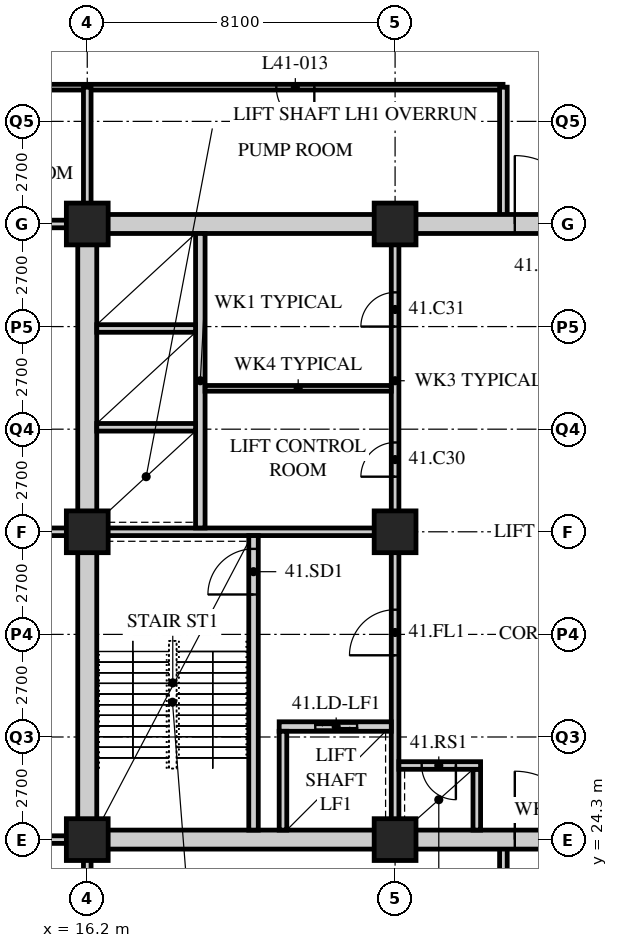
"""IFC4 building model, lengths in metres.
Left out: names, types, materials, properties, quantities, classifications, styles, units other than length and angle.
Written with IfcOpenShell. Run it as: python <this file> out.ifc"""

import sys

from ifc_helpers import new_model, si_unit, direction, frame, frame_2d, origin, origin_2d, place, context, subcontext, project, spatial, rectangle, hollow_rectangle, extrude, element, fill, save


model = new_model("IFC4")
c1 = context("Model", 3, precision=1e-05, world=origin(), true_north=direction((0.0, 1.0)))
c2 = subcontext(c1, "Body", "Model", "MODEL_VIEW")
j1 = project(units=[si_unit("LENGTHUNIT", "METRE"), si_unit("PLANEANGLEUNIT", "RADIAN")], contexts=[c1])
p1 = place(None, origin())
s1 = spatial("IfcSite", under=j1, at=p1, CompositionType="ELEMENT")
p2 = place(p1, origin())
s2 = spatial("IfcBuilding", under=s1, at=p2, CompositionType="ELEMENT")
p3 = place(p2, frame((0.0, 0.0, 157.8)))
s3 = spatial("IfcBuildingStorey", under=s2, at=p3, CompositionType="ELEMENT", Elevation=157.8)
for number, where, z_axis, x_axis in (
    (1, (16.2, 24.3, 0.0), (0.0, 0.0, 1.0), (1.0, 0.0, 0.0)),
    (2, (16.2, 32.4, 0.0), (0.0, 0.0, 1.0), (1.0, 0.0, 0.0)),
    (3, (16.2, 40.5, 0.0), (0.0, 0.0, 1.0), (1.0, 0.0, 0.0)),
    (4, (24.3, 24.3, 0.0), (0.0, 0.0, 1.0), (1.0, 0.0, 0.0)),
    (5, (24.3, 32.4, 0.0), (0.0, 0.0, 1.0), (1.0, 0.0, 0.0)),
    (6, (24.3, 40.5, 0.0), (0.0, 0.0, 1.0), (1.0, 0.0, 0.0)),
):
    element("IfcColumn", number, at=place(p3, frame(where, z_axis=z_axis, x_axis=x_axis)), inside=s3, PredefinedType="COLUMN", context=c2, shape_type="SweptSolid", body=[
        extrude(hollow_rectangle(XDim=1.1, YDim=1.1, WallThickness=0.1, at=origin_2d()), origin(), (0.0, 0.0, 1.0), 7.2),
    ])
p4 = place(p3, frame((27.14, 44.1, 0.0), z_axis=(0.0, 0.0, 1.0), x_axis=(-1.0, 0.0, 0.0)))
e7 = element("IfcWall", 7, at=p4, inside=s3, PredefinedType="PARTITIONING", context=c2, shape_type="SweptSolid", body=[
    extrude(rectangle(XDim=17.24, YDim=0.15, at=frame_2d((8.62, 0.0))), origin(), (0.0, 0.0, 1.0), 6.95),
])
p5 = place(p4, frame((13.59, 0.0, 0.0)))
e8 = element("IfcOpeningElement", 8, at=p5, cuts=e7, PredefinedType="OPENING", context=c2, shape_type="SweptSolid", body=[
    extrude(rectangle(XDim=1.0, YDim=2.1, at=frame_2d((0.5, 1.05))), frame((0.0, 0.085, 0.0), z_axis=(0.0, -1.0, 0.0), x_axis=(1.0, 0.0, 0.0)), (0.0, 0.0, 1.0), 0.17),
])
p6 = place(p4, frame((4.965, 0.0, 0.0)))
e9 = element("IfcOpeningElement", 9, at=p6, cuts=e7, PredefinedType="OPENING", context=c2, shape_type="SweptSolid", body=[
    extrude(rectangle(XDim=1.0, YDim=2.1, at=frame_2d((0.5, 1.05))), frame((0.0, 0.085, 0.0), z_axis=(0.0, -1.0, 0.0), x_axis=(1.0, 0.0, 0.0)), (0.0, 0.0, 1.0), 0.17),
])
p7 = place(p3, frame((9.9, 32.4, 0.0), z_axis=(0.0, 0.0, 1.0), x_axis=(1.0, 0.0, 0.0)))
e10 = element("IfcWall", 10, at=p7, inside=s3, PredefinedType="SOLIDWALL", context=c2, shape_type="SweptSolid", body=[
    extrude(rectangle(XDim=6.3, YDim=0.2, at=frame_2d((3.15, 0.0))), origin(), (0.0, 0.0, 1.0), 6.95),
])
p8 = place(p3, frame((16.2, 15.3, 0.0), z_axis=(0.0, 0.0, 1.0), x_axis=(0.0, 1.0, 0.0)))
e11 = element("IfcWall", 11, at=p8, inside=s3, PredefinedType="SOLIDWALL", context=c2, shape_type="SweptSolid", body=[
    extrude(rectangle(XDim=9.0, YDim=0.2, at=frame_2d((4.5, 0.0))), origin(), (0.0, 0.0, 1.0), 5.95),
])
p9 = place(p3, frame((27.15, 15.3, 0.0), z_axis=(0.0, 0.0, 1.0), x_axis=(0.0, 1.0, 0.0)))
e12 = element("IfcWall", 12, at=p9, inside=s3, PredefinedType="SOLIDWALL", context=c2, shape_type="SweptSolid", body=[
    extrude(rectangle(XDim=9.0, YDim=0.2, at=frame_2d((4.5, 0.0))), origin(), (0.0, 0.0, 1.0), 6.95),
])
p10 = place(p3, frame((16.2, 40.5, 0.0), z_axis=(0.0, 0.0, 1.0), x_axis=(0.0, 1.0, 0.0)))
e13 = element("IfcWall", 13, at=p10, inside=s3, PredefinedType="SOLIDWALL", context=c2, shape_type="SweptSolid", body=[
    extrude(rectangle(XDim=3.6, YDim=0.2, at=frame_2d((1.8, 0.0))), origin(), (0.0, 0.0, 1.0), 5.95),
])
p11 = place(p3, frame((27.15, 40.5, 0.0), z_axis=(0.0, 0.0, 1.0), x_axis=(0.0, 1.0, 0.0)))
e14 = element("IfcWall", 14, at=p11, inside=s3, PredefinedType="SOLIDWALL", context=c2, shape_type="SweptSolid", body=[
    extrude(rectangle(XDim=3.6, YDim=0.2, at=frame_2d((1.8, 0.0))), origin(), (0.0, 0.0, 1.0), 6.95),
])
for number, where, z_axis, x_axis in (
    (15, (9.9, 24.3, 0.0), (0.0, 0.0, 1.0), (1.0, 0.0, 0.0)),
    (16, (9.9, 40.5, 0.0), (0.0, 0.0, 1.0), (1.0, 0.0, 0.0)),
):
    element("IfcWall", number, at=place(p3, frame(where, z_axis=z_axis, x_axis=x_axis)), inside=s3, PredefinedType="SOLIDWALL", context=c2, shape_type="SweptSolid", body=[
        extrude(rectangle(XDim=6.3, YDim=0.2, at=frame_2d((3.15, 0.0))), origin(), (0.0, 0.0, 1.0), 6.95),
    ])
p12 = place(p3, frame((15.95, 24.3, 0.0), z_axis=(0.0, 0.0, 1.0), x_axis=(1.0, 0.0, 0.0)))
e17 = element("IfcWall", 17, at=p12, inside=s3, PredefinedType="SOLIDWALL", context=c2, shape_type="SweptSolid", body=[
    extrude(rectangle(XDim=24.8, YDim=0.5, at=frame_2d((12.4, 0.0))), origin(), (0.0, 0.0, 1.0), 6.18),
])
p13 = place(p12, frame((11.5, 0.0, 0.0)))
e18 = element("IfcOpeningElement", 18, at=p13, cuts=e17, PredefinedType="OPENING", context=c2, shape_type="SweptSolid", body=[
    extrude(rectangle(XDim=1.8, YDim=2.4, at=frame_2d((0.9, 1.2))), frame((0.0, 0.26, 0.0), z_axis=(0.0, -1.0, 0.0), x_axis=(1.0, 0.0, 0.0)), (0.0, 0.0, 1.0), 0.52),
])
p14 = place(p3, frame((15.95, 40.5, 0.0), z_axis=(0.0, 0.0, 1.0), x_axis=(1.0, 0.0, 0.0)))
e19 = element("IfcWall", 19, at=p14, inside=s3, PredefinedType="SOLIDWALL", context=c2, shape_type="SweptSolid", body=[
    extrude(rectangle(XDim=24.8, YDim=0.5, at=frame_2d((12.4, 0.0))), origin(), (0.0, 0.0, 1.0), 6.18),
])
p15 = place(p14, frame((11.5, 0.0, 0.0)))
e20 = element("IfcOpeningElement", 20, at=p15, cuts=e19, PredefinedType="OPENING", context=c2, shape_type="SweptSolid", body=[
    extrude(rectangle(XDim=1.8, YDim=2.4, at=frame_2d((0.9, 1.2))), frame((0.0, 0.26, 0.0), z_axis=(0.0, -1.0, 0.0), x_axis=(1.0, 0.0, 0.0)), (0.0, 0.0, 1.0), 0.52),
])
p16 = place(p3, frame((16.2, 24.55, 0.0), z_axis=(0.0, 0.0, 1.0), x_axis=(0.0, 1.0, 0.0)))
e21 = element("IfcWall", 21, at=p16, inside=s3, PredefinedType="SOLIDWALL", context=c2, shape_type="SweptSolid", body=[
    extrude(rectangle(XDim=15.7, YDim=0.5, at=frame_2d((7.85, 0.0))), origin(), (0.0, 0.0, 1.0), 5.95),
])
p17 = place(p3, frame((16.45, 32.4, 0.0), z_axis=(0.0, 0.0, 1.0), x_axis=(1.0, 0.0, 0.0)))
e22 = element("IfcWall", 22, at=p17, inside=s3, PredefinedType="SOLIDWALL", context=c2, shape_type="SweptSolid", body=[
    extrude(rectangle(XDim=7.95, YDim=0.2, at=frame_2d((3.975, 0.0))), origin(), (0.0, 0.0, 1.0), 6.25),
])
p18 = place(p3, frame((24.3, 24.55, 0.0), z_axis=(0.0, 0.0, 1.0), x_axis=(0.0, 1.0, 0.0)))
e23 = element("IfcWall", 23, at=p18, inside=s3, PredefinedType="SOLIDWALL", context=c2, shape_type="SweptSolid", body=[
    extrude(rectangle(XDim=7.75, YDim=0.2, at=frame_2d((3.875, 0.0))), origin(), (0.0, 0.0, 1.0), 6.25),
])
p19 = place(p18, frame((4.6, 0.0, 0.0)))
e24 = element("IfcOpeningElement", 24, at=p19, cuts=e23, PredefinedType="OPENING", context=c2, shape_type="SweptSolid", body=[
    extrude(rectangle(XDim=1.2, YDim=2.1, at=frame_2d((0.6, 1.05))), frame((0.0, 0.11, 0.0), z_axis=(0.0, -1.0, 0.0), x_axis=(1.0, 0.0, 0.0)), (0.0, 0.0, 1.0), 0.22),
])
p20 = place(p3, frame((20.575, 24.55, 0.0), z_axis=(0.0, 0.0, 1.0), x_axis=(0.0, 1.0, 0.0)))
e25 = element("IfcWall", 25, at=p20, inside=s3, PredefinedType="SOLIDWALL", context=c2, shape_type="SweptSolid", body=[
    extrude(rectangle(XDim=7.75, YDim=0.25, at=frame_2d((3.875, 0.0))), origin(), (0.0, 0.0, 1.0), 6.95),
])
p21 = place(p20, frame((6.2, 0.0, 0.0)))
e26 = element("IfcOpeningElement", 26, at=p21, cuts=e25, PredefinedType="OPENING", context=c2, shape_type="SweptSolid", body=[
    extrude(rectangle(XDim=1.2, YDim=2.1, at=frame_2d((0.6, 1.05))), frame((0.0, 0.135, 0.0), z_axis=(0.0, -1.0, 0.0), x_axis=(1.0, 0.0, 0.0)), (0.0, 0.0, 1.0), 0.27),
])
p22 = place(p3, frame((21.25, 27.275, 0.0), z_axis=(0.0, 0.0, 1.0), x_axis=(1.0, 0.0, 0.0)))
e27 = element("IfcWall", 27, at=p22, inside=s3, PredefinedType="SOLIDWALL", context=c2, shape_type="SweptSolid", body=[
    extrude(rectangle(XDim=2.95, YDim=0.25, at=frame_2d((1.475, 0.0))), origin(), (0.0, 0.0, 1.0), 6.95),
])
p23 = place(p22, frame((0.95, 0.0, 0.0)))
e28 = element("IfcOpeningElement", 28, at=p23, cuts=e27, PredefinedType="OPENING", context=c2, shape_type="SweptSolid", body=[
    extrude(rectangle(XDim=1.1, YDim=2.4, at=frame_2d((0.55, 1.2))), frame((0.0, 0.135, 0.0), z_axis=(0.0, -1.0, 0.0), x_axis=(1.0, 0.0, 0.0)), (0.0, 0.0, 1.0), 0.27),
])
p24 = place(p3, frame((21.35, 24.55, 0.0), z_axis=(0.0, 0.0, 1.0), x_axis=(0.0, 1.0, 0.0)))
e29 = element("IfcWall", 29, at=p24, inside=s3, PredefinedType="SOLIDWALL", context=c2, shape_type="SweptSolid", body=[
    extrude(rectangle(XDim=2.6, YDim=0.2, at=frame_2d((1.3, 0.0))), origin(), (0.0, 0.0, 1.0), 6.95),
])
p25 = place(p3, frame((19.175, 32.5, 0.0), z_axis=(0.0, 0.0, 1.0), x_axis=(0.0, 1.0, 0.0)))
e30 = element("IfcWall", 30, at=p25, inside=s3, PredefinedType="SOLIDWALL", context=c2, shape_type="SweptSolid", body=[
    extrude(rectangle(XDim=7.75, YDim=0.25, at=frame_2d((3.875, 0.0))), origin(), (0.0, 0.0, 1.0), 6.95),
])
for number, where, z_axis, x_axis in (
    (31, (16.45, 35.15, 0.0), (0.0, 0.0, 1.0), (1.0, 0.0, 0.0)),
    (32, (16.45, 37.75, 0.0), (0.0, 0.0, 1.0), (1.0, 0.0, 0.0)),
):
    element("IfcWall", number, at=place(p3, frame(where, z_axis=z_axis, x_axis=x_axis)), inside=s3, PredefinedType="SOLIDWALL", context=c2, shape_type="SweptSolid", body=[
        extrude(rectangle(XDim=2.6, YDim=0.2, at=frame_2d((1.3, 0.0))), origin(), (0.0, 0.0, 1.0), 6.95),
    ])
p26 = place(p3, frame((26.45, 24.55, 0.0), z_axis=(0.0, 0.0, 1.0), x_axis=(0.0, 1.0, 0.0)))
e33 = element("IfcWall", 33, at=p26, inside=s3, PredefinedType="SOLIDWALL", context=c2, shape_type="SweptSolid", body=[
    extrude(rectangle(XDim=1.6, YDim=0.2, at=frame_2d((0.8, 0.0))), origin(), (0.0, 0.0, 1.0), 6.95),
])
p27 = place(p3, frame((24.4, 26.25, 0.0), z_axis=(0.0, 0.0, 1.0), x_axis=(1.0, 0.0, 0.0)))
e34 = element("IfcWall", 34, at=p27, inside=s3, PredefinedType="SOLIDWALL", context=c2, shape_type="SweptSolid", body=[
    extrude(rectangle(XDim=2.15, YDim=0.2, at=frame_2d((1.075, 0.0))), origin(), (0.0, 0.0, 1.0), 6.95),
])
p28 = place(p27, frame((0.6, 0.0, 0.0)))
e35 = element("IfcOpeningElement", 35, at=p28, cuts=e34, PredefinedType="OPENING", context=c2, shape_type="SweptSolid", body=[
    extrude(rectangle(XDim=0.9, YDim=2.1, at=frame_2d((0.45, 1.05))), frame((0.0, 0.11, 0.0), z_axis=(0.0, -1.0, 0.0), x_axis=(1.0, 0.0, 0.0)), (0.0, 0.0, 1.0), 0.22),
])
p29 = place(p3, frame((24.3, 32.5, 0.0), z_axis=(0.0, 0.0, 1.0), x_axis=(0.0, 1.0, 0.0)))
e36 = element("IfcWall", 36, at=p29, inside=s3, PredefinedType="PARTITIONING", context=c2, shape_type="SweptSolid", body=[
    extrude(rectangle(XDim=7.75, YDim=0.2, at=frame_2d((3.875, 0.0))), origin(), (0.0, 0.0, 1.0), 6.25),
])
p30 = place(p29, frame((1.35, 0.0, 0.0)))
e37 = element("IfcOpeningElement", 37, at=p30, cuts=e36, PredefinedType="OPENING", context=c2, shape_type="SweptSolid", body=[
    extrude(rectangle(XDim=0.9, YDim=2.1, at=frame_2d((0.45, 1.05))), frame((0.0, 0.11, 0.0), z_axis=(0.0, -1.0, 0.0), x_axis=(1.0, 0.0, 0.0)), (0.0, 0.0, 1.0), 0.22),
])
p31 = place(p29, frame((5.3, 0.0, 0.0)))
e38 = element("IfcOpeningElement", 38, at=p31, cuts=e36, PredefinedType="OPENING", context=c2, shape_type="SweptSolid", body=[
    extrude(rectangle(XDim=0.9, YDim=2.1, at=frame_2d((0.45, 1.05))), frame((0.0, 0.11, 0.0), z_axis=(0.0, -1.0, 0.0), x_axis=(1.0, 0.0, 0.0)), (0.0, 0.0, 1.0), 0.22),
])
p32 = place(p3, frame((19.3, 36.175, 0.0), z_axis=(0.0, 0.0, 1.0), x_axis=(1.0, 0.0, 0.0)))
e39 = element("IfcWall", 39, at=p32, inside=s3, PredefinedType="PARTITIONING", context=c2, shape_type="SweptSolid", body=[
    extrude(rectangle(XDim=4.9, YDim=0.15, at=frame_2d((2.45, 0.0))), origin(), (0.0, 0.0, 1.0), 6.95),
])
p33 = place(p6, origin())
e40 = element("IfcDoor", 40, at=p33, inside=s3, OperationType="SINGLE_SWING_LEFT", PredefinedType="DOOR", context=c2, shape_type="SweptSolid", body=[
    extrude(rectangle(XDim=1.0, YDim=2.1, at=frame_2d((0.5, 1.05))), frame((0.0, 0.025, 0.0), z_axis=(0.0, -1.0, 0.0), x_axis=(1.0, 0.0, 0.0)), (0.0, 0.0, 1.0), 0.05),
])
fill(e9, e40)
p34 = place(p30, origin())
e41 = element("IfcDoor", 41, at=p34, inside=s3, OperationType="SINGLE_SWING_LEFT", PredefinedType="DOOR", context=c2, shape_type="SweptSolid", body=[
    extrude(rectangle(XDim=0.9, YDim=2.1, at=frame_2d((0.45, 1.05))), frame((0.0, 0.025, 0.0), z_axis=(0.0, -1.0, 0.0), x_axis=(1.0, 0.0, 0.0)), (0.0, 0.0, 1.0), 0.05),
])
fill(e37, e41)
p35 = place(p31, origin())
e42 = element("IfcDoor", 42, at=p35, inside=s3, OperationType="SINGLE_SWING_LEFT", PredefinedType="DOOR", context=c2, shape_type="SweptSolid", body=[
    extrude(rectangle(XDim=0.9, YDim=2.1, at=frame_2d((0.45, 1.05))), frame((0.0, 0.025, 0.0), z_axis=(0.0, -1.0, 0.0), x_axis=(1.0, 0.0, 0.0)), (0.0, 0.0, 1.0), 0.05),
])
fill(e38, e42)
p36 = place(p21, origin())
e43 = element("IfcDoor", 43, at=p36, inside=s3, OperationType="SINGLE_SWING_LEFT", PredefinedType="DOOR", context=c2, shape_type="SweptSolid", body=[
    extrude(rectangle(XDim=1.2, YDim=2.1, at=frame_2d((0.6, 1.05))), frame((0.0, 0.025, 0.0), z_axis=(0.0, -1.0, 0.0), x_axis=(1.0, 0.0, 0.0)), (0.0, 0.0, 1.0), 0.05),
])
fill(e26, e43)
p37 = place(p19, origin())
e44 = element("IfcDoor", 44, at=p37, inside=s3, OperationType="SINGLE_SWING_LEFT", PredefinedType="DOOR", context=c2, shape_type="SweptSolid", body=[
    extrude(rectangle(XDim=1.2, YDim=2.1, at=frame_2d((0.6, 1.05))), frame((0.0, 0.025, 0.0), z_axis=(0.0, -1.0, 0.0), x_axis=(1.0, 0.0, 0.0)), (0.0, 0.0, 1.0), 0.05),
])
fill(e24, e44)
p38 = place(p28, origin())
e45 = element("IfcDoor", 45, at=p38, inside=s3, OperationType="SINGLE_SWING_LEFT", PredefinedType="DOOR", context=c2, shape_type="SweptSolid", body=[
    extrude(rectangle(XDim=0.9, YDim=2.1, at=frame_2d((0.45, 1.05))), frame((0.0, 0.025, 0.0), z_axis=(0.0, -1.0, 0.0), x_axis=(1.0, 0.0, 0.0)), (0.0, 0.0, 1.0), 0.05),
])
fill(e35, e45)
p39 = place(p23, origin())
e46 = element("IfcDoor", 46, at=p39, inside=s3, OperationType="DOUBLE_DOOR_SLIDING", PredefinedType="DOOR", context=c2, shape_type="SweptSolid", body=[
    extrude(rectangle(XDim=1.1, YDim=2.4, at=frame_2d((0.55, 1.2))), frame((0.0, 0.025, 0.0), z_axis=(0.0, -1.0, 0.0), x_axis=(1.0, 0.0, 0.0)), (0.0, 0.0, 1.0), 0.05),
])
fill(e28, e46)
p40 = place(p13, origin())
e47 = element("IfcDoor", 47, at=p40, inside=s3, OperationType="DOUBLE_DOOR_SINGLE_SWING", PredefinedType="DOOR", context=c2, shape_type="SweptSolid", body=[
    extrude(rectangle(XDim=1.8, YDim=2.4, at=frame_2d((0.9, 1.2))), frame((0.0, 0.025, 0.0), z_axis=(0.0, -1.0, 0.0), x_axis=(1.0, 0.0, 0.0)), (0.0, 0.0, 1.0), 0.05),
])
fill(e18, e47)
p41 = place(p15, origin())
e48 = element("IfcDoor", 48, at=p41, inside=s3, OperationType="DOUBLE_DOOR_SINGLE_SWING", PredefinedType="DOOR", context=c2, shape_type="SweptSolid", body=[
    extrude(rectangle(XDim=1.8, YDim=2.4, at=frame_2d((0.9, 1.2))), frame((0.0, 0.025, 0.0), z_axis=(0.0, -1.0, 0.0), x_axis=(1.0, 0.0, 0.0)), (0.0, 0.0, 1.0), 0.05),
])
fill(e20, e48)
save(model, sys.argv[1])
